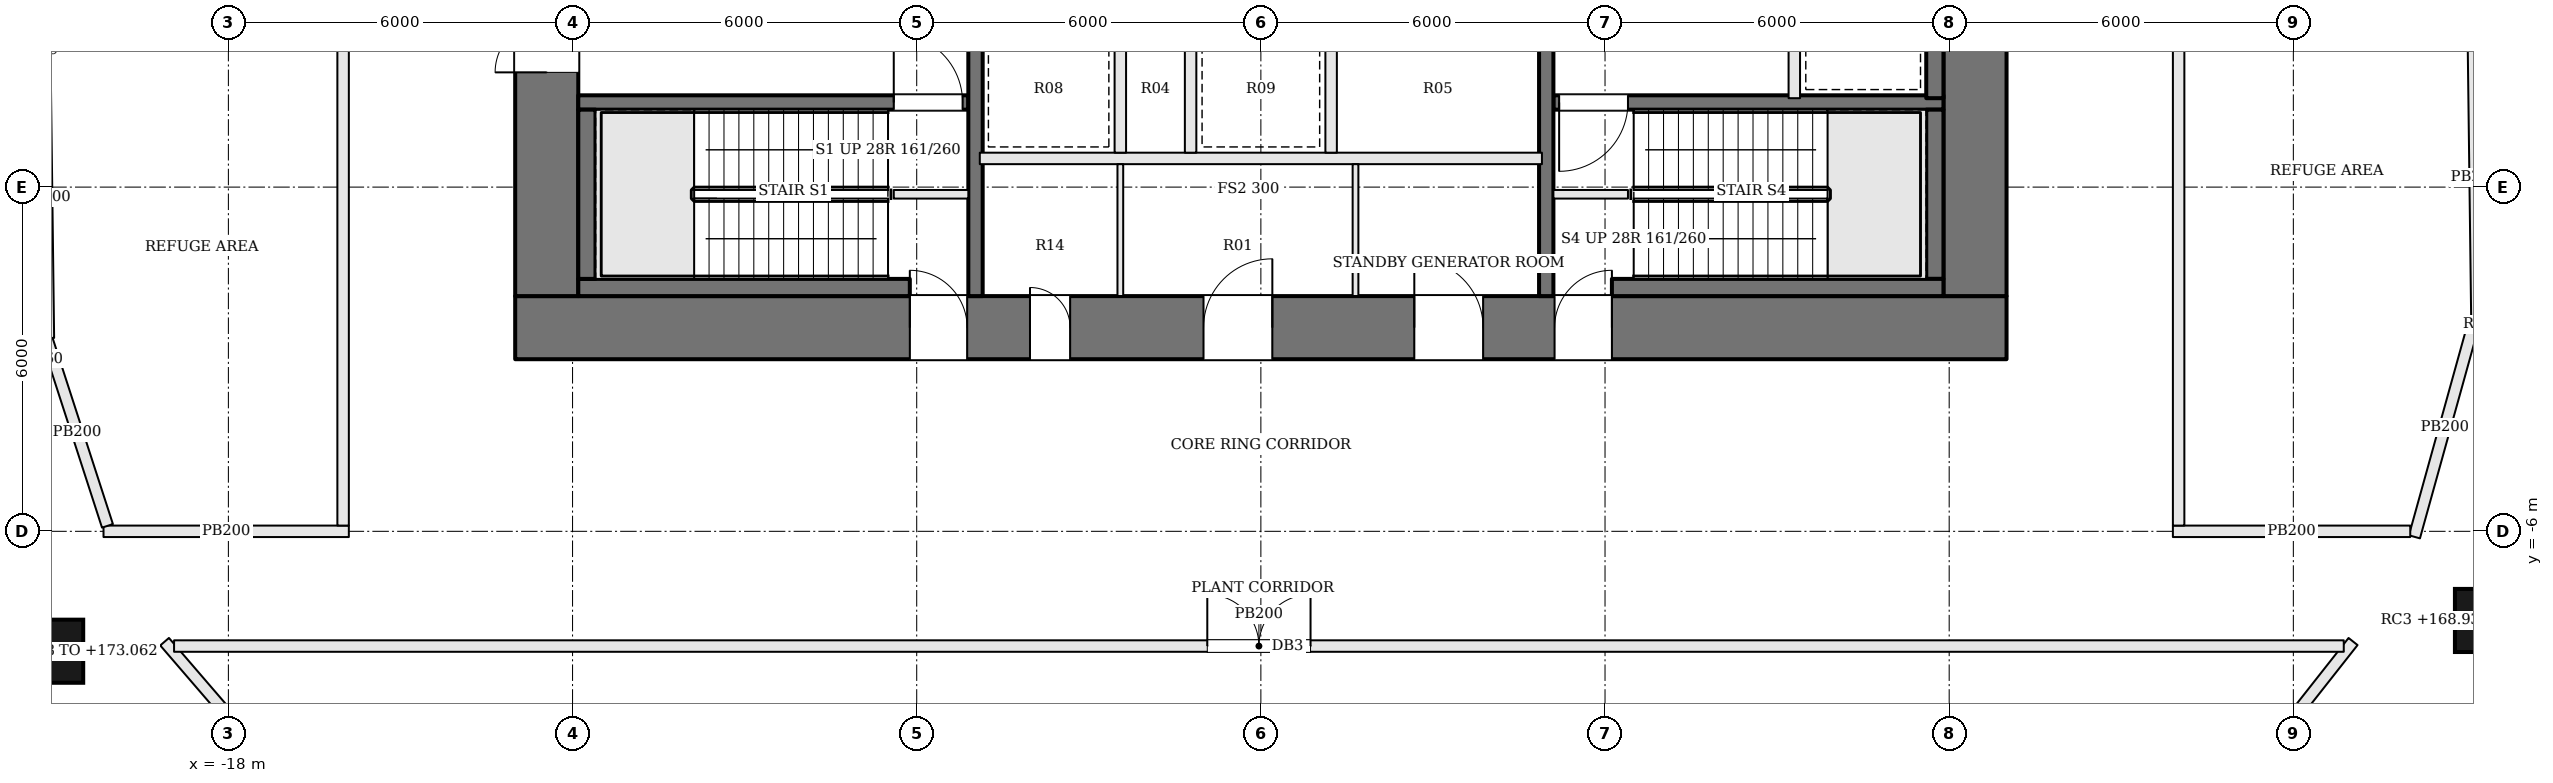
"""IFC4 building model, lengths in metres.
Left out: names, types, materials, properties, quantities, classifications, styles, units other than length and angle.
Written with IfcOpenShell. Run it as: python <this file> out.ifc"""

import sys

from ifc_helpers import new_model, si_unit, direction, frame, frame_2d, origin, origin_2d, place, context, subcontext, project, spatial, rectangle, extrude, element, fill, save


model = new_model("IFC4")
c1 = context("Model", 3, precision=1e-05, world=origin(), true_north=direction((0.0, 1.0)))
c2 = subcontext(c1, "Body", "Model", "MODEL_VIEW")
j1 = project(units=[si_unit("LENGTHUNIT", "METRE"), si_unit("PLANEANGLEUNIT", "RADIAN")], contexts=[c1])
p1 = place(None, origin())
s1 = spatial("IfcSite", under=j1, at=p1, CompositionType="ELEMENT")
p2 = place(p1, origin())
s2 = spatial("IfcBuilding", under=s1, at=p2, CompositionType="ELEMENT")
p3 = place(p2, frame((0.0, 0.0, 169.5)))
s3 = spatial("IfcBuildingStorey", under=s2, at=p3, CompositionType="ELEMENT", Elevation=169.5)
p4 = place(p3, frame((-13.0, -2.45, 0.0), z_axis=(0.0, 0.0, 1.0), x_axis=(1.0, 0.0, 0.0)))
e1 = element("IfcWall", 1, at=p4, inside=s3, PredefinedType="SHEAR", context=c2, shape_type="SweptSolid", body=[
    extrude(rectangle(XDim=26.0, YDim=1.1, at=frame_2d((13.0, 0.0))), origin(), (0.0, 0.0, 1.0), 4.5),
])
p5 = place(p4, frame((8.975, 0.0, 0.0)))
e2 = element("IfcOpeningElement", 2, at=p5, cuts=e1, PredefinedType="OPENING", context=c2, shape_type="SweptSolid", body=[
    extrude(rectangle(XDim=0.7, YDim=2.1, at=frame_2d((0.35, 1.05))), frame((0.0, 0.56, 0.0), z_axis=(0.0, -1.0, 0.0), x_axis=(1.0, 0.0, 0.0)), (0.0, 0.0, 1.0), 1.12),
])
p6 = place(p4, frame((12.0, 0.0, 0.0)))
e3 = element("IfcOpeningElement", 3, at=p6, cuts=e1, PredefinedType="OPENING", context=c2, shape_type="SweptSolid", body=[
    extrude(rectangle(XDim=1.2, YDim=2.1, at=frame_2d((0.6, 1.05))), frame((0.0, 0.56, 0.0), z_axis=(0.0, -1.0, 0.0), x_axis=(1.0, 0.0, 0.0)), (0.0, 0.0, 1.0), 1.12),
])
p7 = place(p4, frame((15.675, 0.0, 0.0)))
e4 = element("IfcOpeningElement", 4, at=p7, cuts=e1, PredefinedType="OPENING", context=c2, shape_type="SweptSolid", body=[
    extrude(rectangle(XDim=1.2, YDim=2.1, at=frame_2d((0.6, 1.05))), frame((0.0, 0.56, 0.0), z_axis=(0.0, -1.0, 0.0), x_axis=(1.0, 0.0, 0.0)), (0.0, 0.0, 1.0), 1.12),
])
p8 = place(p4, frame((6.88, 0.0, 0.0)))
e5 = element("IfcOpeningElement", 5, at=p8, cuts=e1, PredefinedType="OPENING", context=c2, shape_type="SweptSolid", body=[
    extrude(rectangle(XDim=1.0, YDim=2.1, at=frame_2d((0.5, 1.05))), frame((0.0, 0.56, 0.0), z_axis=(0.0, -1.0, 0.0), x_axis=(1.0, 0.0, 0.0)), (0.0, 0.0, 1.0), 1.12),
])
p9 = place(p4, frame((18.12, 0.0, 0.0)))
e6 = element("IfcOpeningElement", 6, at=p9, cuts=e1, PredefinedType="OPENING", context=c2, shape_type="SweptSolid", body=[
    extrude(rectangle(XDim=1.0, YDim=2.1, at=frame_2d((0.5, 1.05))), frame((0.0, 0.56, 0.0), z_axis=(0.0, -1.0, 0.0), x_axis=(1.0, 0.0, 0.0)), (0.0, 0.0, 1.0), 1.12),
])
p10 = place(p3, frame((12.45, -1.9, 0.0), z_axis=(0.0, 0.0, 1.0), x_axis=(0.0, 1.0, 0.0)))
e7 = element("IfcWall", 7, at=p10, inside=s3, PredefinedType="SHEAR", context=c2, shape_type="SweptSolid", body=[
    extrude(rectangle(XDim=12.8, YDim=1.1, at=frame_2d((6.4, 0.0))), origin(), (0.0, 0.0, 1.0), 4.5),
])
p11 = place(p10, frame((7.1, 0.0, 0.0)))
e8 = element("IfcOpeningElement", 8, at=p11, cuts=e7, PredefinedType="OPENING", context=c2, shape_type="SweptSolid", body=[
    extrude(rectangle(XDim=1.8, YDim=2.1, at=frame_2d((0.9, 1.05))), frame((0.0, 0.56, 0.0), z_axis=(0.0, -1.0, 0.0), x_axis=(1.0, 0.0, 0.0)), (0.0, 0.0, 1.0), 1.12),
])
p12 = place(p3, frame((-12.45, -1.9, 0.0), z_axis=(0.0, 0.0, 1.0), x_axis=(0.0, 1.0, 0.0)))
e9 = element("IfcWall", 9, at=p12, inside=s3, PredefinedType="SHEAR", context=c2, shape_type="SweptSolid", body=[
    extrude(rectangle(XDim=12.8, YDim=1.1, at=frame_2d((6.4, 0.0))), origin(), (0.0, 0.0, 1.0), 4.5),
])
p13 = place(p12, frame((3.9, 0.0, 0.0)))
e10 = element("IfcOpeningElement", 10, at=p13, cuts=e9, PredefinedType="OPENING", context=c2, shape_type="SweptSolid", body=[
    extrude(rectangle(XDim=1.8, YDim=2.1, at=frame_2d((0.9, 1.05))), frame((0.0, 0.56, 0.0), z_axis=(0.0, -1.0, 0.0), x_axis=(1.0, 0.0, 0.0)), (0.0, 0.0, 1.0), 1.12),
])
p14 = place(p3, frame((-21.081, -8.09, -0.562), z_axis=(-0.394911202238, -0.153105850406, 0.90587181263), x_axis=(0.361480683506, -0.932379598367, 0.0)))
e11 = element("IfcColumn", 11, at=p14, inside=s3, PredefinedType="COLUMN", context=c2, shape_type="SweptSolid", body=[
    extrude(rectangle(XDim=1.1, YDim=1.1, at=origin_2d()), origin(), (0.0, 0.0, 1.0), 4.552),
])
p15 = place(p3, frame((21.367, -7.554, -0.562), z_axis=(0.399191098606, -0.144034709541, 0.905483555478), x_axis=(0.339399243932, 0.940642415171, 0.0)))
e12 = element("IfcColumn", 12, at=p15, inside=s3, PredefinedType="COLUMN", context=c2, shape_type="SweptSolid", body=[
    extrude(rectangle(XDim=1.1, YDim=1.1, at=origin_2d()), origin(), (0.0, 0.0, 1.0), 4.554),
])
for number, where, z_axis, x_axis in (
    (13, (-6.4, -0.125, 0.0), (0.0, 0.0, 1.0), (1.0, 0.0, 0.0)),
    (14, (6.4, -0.125, 0.0), (0.0, 0.0, 1.0), (-1.0, 0.0, 0.0)),
):
    element("IfcWall", number, at=place(p3, frame(where, z_axis=z_axis, x_axis=x_axis)), inside=s3, PredefinedType="SOLIDWALL", context=c2, shape_type="SweptSolid", body=[
        extrude(rectangle(XDim=1.3, YDim=0.15, at=frame_2d((0.65, 0.0))), origin(), (0.0, 0.0, 1.0), 4.3),
    ])
p16 = place(p3, frame((-11.9, 1.475, 0.0), z_axis=(0.0, 0.0, 1.0), x_axis=(1.0, 0.0, 0.0)))
e15 = element("IfcWall", 15, at=p16, inside=s3, PredefinedType="SOLIDWALL", context=c2, shape_type="SweptSolid", body=[
    extrude(rectangle(XDim=6.8, YDim=0.25, at=frame_2d((3.4, 0.0))), origin(), (0.0, 0.0, 1.0), 4.3),
])
p17 = place(p16, frame((5.5, 0.0, 0.0)))
e16 = element("IfcOpeningElement", 16, at=p17, cuts=e15, PredefinedType="OPENING", context=c2, shape_type="SweptSolid", body=[
    extrude(rectangle(XDim=1.2, YDim=2.1, at=frame_2d((0.6, 1.05))), frame((0.0, 0.135, 0.0), z_axis=(0.0, -1.0, 0.0), x_axis=(1.0, 0.0, 0.0)), (0.0, 0.0, 1.0), 0.27),
])
p18 = place(p3, frame((11.9, 1.475, 0.0), z_axis=(0.0, 0.0, 1.0), x_axis=(-1.0, 0.0, 0.0)))
e17 = element("IfcWall", 17, at=p18, inside=s3, PredefinedType="SOLIDWALL", context=c2, shape_type="SweptSolid", body=[
    extrude(rectangle(XDim=6.8, YDim=0.25, at=frame_2d((3.4, 0.0))), origin(), (0.0, 0.0, 1.0), 4.3),
])
p19 = place(p18, frame((5.5, 0.0, 0.0)))
e18 = element("IfcOpeningElement", 18, at=p19, cuts=e17, PredefinedType="OPENING", context=c2, shape_type="SweptSolid", body=[
    extrude(rectangle(XDim=1.2, YDim=2.1, at=frame_2d((0.6, 1.05))), frame((0.0, 0.135, 0.0), z_axis=(0.0, -1.0, 0.0), x_axis=(1.0, 0.0, 0.0)), (0.0, 0.0, 1.0), 0.27),
])
p20 = place(p3, frame((9.3, 4.55, 0.0), z_axis=(0.0, 0.0, 1.0), x_axis=(0.0, -1.0, 0.0)))
e19 = element("IfcWall", 19, at=p20, inside=s3, PredefinedType="SOLIDWALL", context=c2, shape_type="SweptSolid", body=[
    extrude(rectangle(XDim=3.0, YDim=0.2, at=frame_2d((1.5, 0.0))), origin(), (0.0, 0.0, 1.0), 4.3),
])
p21 = place(p3, frame((-4.975, -1.9, 0.0), z_axis=(0.0, 0.0, 1.0), x_axis=(0.0, 1.0, 0.0)))
e20 = element("IfcWall", 20, at=p21, inside=s3, PredefinedType="SOLIDWALL", context=c2, shape_type="SweptSolid", body=[
    extrude(rectangle(XDim=12.8, YDim=0.25, at=frame_2d((6.4, 0.0))), origin(), (0.0, 0.0, 1.0), 4.3),
])
p22 = place(p21, frame((4.95, 0.0, 0.0)))
e21 = element("IfcOpeningElement", 21, at=p22, cuts=e20, PredefinedType="OPENING", context=c2, shape_type="SweptSolid", body=[
    extrude(rectangle(XDim=1.2, YDim=2.1, at=frame_2d((0.6, 1.05))), frame((0.0, 0.135, 0.0), z_axis=(0.0, -1.0, 0.0), x_axis=(1.0, 0.0, 0.0)), (0.0, 0.0, 1.0), 0.27),
])
p23 = place(p3, frame((4.975, 10.9, 0.0), z_axis=(0.0, 0.0, 1.0), x_axis=(0.0, -1.0, 0.0)))
e22 = element("IfcWall", 22, at=p23, inside=s3, PredefinedType="SOLIDWALL", context=c2, shape_type="SweptSolid", body=[
    extrude(rectangle(XDim=12.8, YDim=0.25, at=frame_2d((6.4, 0.0))), origin(), (0.0, 0.0, 1.0), 4.3),
])
p24 = place(p23, frame((4.95, 0.0, 0.0)))
e23 = element("IfcOpeningElement", 23, at=p24, cuts=e22, PredefinedType="OPENING", context=c2, shape_type="SweptSolid", body=[
    extrude(rectangle(XDim=1.2, YDim=2.1, at=frame_2d((0.6, 1.05))), frame((0.0, 0.135, 0.0), z_axis=(0.0, -1.0, 0.0), x_axis=(1.0, 0.0, 0.0)), (0.0, 0.0, 1.0), 0.27),
])
p25 = place(p3, frame((-11.9, -1.75, 0.0), z_axis=(0.0, 0.0, 1.0), x_axis=(1.0, 0.0, 0.0)))
e24 = element("IfcWall", 24, at=p25, inside=s3, PredefinedType="SOLIDWALL", context=c2, shape_type="SweptSolid", body=[
    extrude(rectangle(XDim=5.78, YDim=0.3, at=frame_2d((2.89, 0.0))), origin(), (0.0, 0.0, 1.0), 4.3),
])
p26 = place(p3, frame((-11.75, -1.6, 0.0), z_axis=(0.0, 0.0, 1.0), x_axis=(0.0, 1.0, 0.0)))
e25 = element("IfcWall", 25, at=p26, inside=s3, PredefinedType="SOLIDWALL", context=c2, shape_type="SweptSolid", body=[
    extrude(rectangle(XDim=2.95, YDim=0.3, at=frame_2d((1.475, 0.0))), origin(), (0.0, 0.0, 1.0), 4.3),
])
p27 = place(p3, frame((11.75, 4.55, 0.0), z_axis=(0.0, 0.0, 1.0), x_axis=(0.0, -1.0, 0.0)))
e26 = element("IfcWall", 26, at=p27, inside=s3, PredefinedType="SOLIDWALL", context=c2, shape_type="SweptSolid", body=[
    extrude(rectangle(XDim=3.0, YDim=0.3, at=frame_2d((1.5, 0.0))), origin(), (0.0, 0.0, 1.0), 4.3),
])
p28 = place(p3, frame((11.75, 1.35, 0.0), z_axis=(0.0, 0.0, 1.0), x_axis=(0.0, -1.0, 0.0)))
e27 = element("IfcWall", 27, at=p28, inside=s3, PredefinedType="SOLIDWALL", context=c2, shape_type="SweptSolid", body=[
    extrude(rectangle(XDim=2.95, YDim=0.3, at=frame_2d((1.475, 0.0))), origin(), (0.0, 0.0, 1.0), 4.3),
])
p29 = place(p3, frame((11.9, -1.75, 0.0), z_axis=(0.0, 0.0, 1.0), x_axis=(-1.0, 0.0, 0.0)))
e28 = element("IfcWall", 28, at=p29, inside=s3, PredefinedType="SOLIDWALL", context=c2, shape_type="SweptSolid", body=[
    extrude(rectangle(XDim=5.78, YDim=0.3, at=frame_2d((2.89, 0.0))), origin(), (0.0, 0.0, 1.0), 4.3),
])
p30 = place(p3, frame((-4.9, 0.5, 0.0), z_axis=(0.0, 0.0, 1.0), x_axis=(1.0, 0.0, 0.0)))
e29 = element("IfcWall", 29, at=p30, inside=s3, PredefinedType="SOLIDWALL", context=c2, shape_type="SweptSolid", body=[
    extrude(rectangle(XDim=9.8, YDim=0.2, at=frame_2d((4.9, 0.0))), origin(), (0.0, 0.0, 1.0), 4.3),
])
for number, where, z_axis, x_axis in (
    (30, (-2.45, 0.6, 0.0), (0.0, 0.0, 1.0), (0.0, 1.0, 0.0)),
    (31, (-1.225, 0.6, 0.0), (0.0, 0.0, 1.0), (0.0, 1.0, 0.0)),
    (32, (1.225, 0.6, 0.0), (0.0, 0.0, 1.0), (0.0, 1.0, 0.0)),
):
    element("IfcWall", number, at=place(p3, frame(where, z_axis=z_axis, x_axis=x_axis)), inside=s3, PredefinedType="SOLIDWALL", context=c2, shape_type="SweptSolid", body=[
        extrude(rectangle(XDim=2.2, YDim=0.2, at=frame_2d((1.1, 0.0))), origin(), (0.0, 0.0, 1.0), 4.3),
    ])
for number, where, z_axis, x_axis in (
    (33, (-2.45, -1.9, 0.0), (0.0, 0.0, 1.0), (0.0, 1.0, 0.0)),
    (34, (1.65, -1.9, 0.0), (0.0, 0.0, 1.0), (0.0, 1.0, 0.0)),
):
    element("IfcWall", number, at=place(p3, frame(where, z_axis=z_axis, x_axis=x_axis)), inside=s3, PredefinedType="PARTITIONING", context=c2, shape_type="SweptSolid", body=[
        extrude(rectangle(XDim=2.3, YDim=0.1, at=frame_2d((1.15, 0.0))), origin(), (0.0, 0.0, 1.0), 4.3),
    ])
p31 = place(p3, frame((19.041, -7.921, 0.0), z_axis=(0.0, 0.0, 1.0), x_axis=(-0.618817980567, -0.785534408493, 0.0)))
e35 = element("IfcWall", 35, at=p31, inside=s3, PredefinedType="PARTITIONING", context=c2, shape_type="SweptSolid", body=[
    extrude(rectangle(XDim=3.45, YDim=0.2, at=frame_2d((1.725, 0.0))), origin(), (0.0, 0.0, 1.0), 4.3),
])
p32 = place(p3, frame((-16.614, -10.824, 0.0), z_axis=(0.0, 0.0, 1.0), x_axis=(-0.652659458067, 0.757651391998, 0.0)))
e36 = element("IfcWall", 36, at=p32, inside=s3, PredefinedType="PARTITIONING", context=c2, shape_type="SweptSolid", body=[
    extrude(rectangle(XDim=3.827, YDim=0.2, at=frame_2d((1.914, 0.0))), origin(), (0.0, 0.0, 1.0), 4.3),
])
p33 = place(p3, frame((-18.947, -8.0, 0.0), z_axis=(0.0, 0.0, 1.0), x_axis=(1.0, 0.0, 0.0)))
e37 = element("IfcWall", 37, at=p33, inside=s3, PredefinedType="PARTITIONING", context=c2, shape_type="SweptSolid", body=[
    extrude(rectangle(XDim=37.826, YDim=0.2, at=frame_2d((18.913, 0.0))), origin(), (0.0, 0.0, 1.0), 4.3),
])
p34 = place(p33, frame((18.013, 0.0, 0.0)))
e38 = element("IfcOpeningElement", 38, at=p34, cuts=e37, PredefinedType="OPENING", context=c2, shape_type="SweptSolid", body=[
    extrude(rectangle(XDim=1.8, YDim=2.1, at=frame_2d((0.9, 1.05))), frame((0.0, 0.11, 0.0), z_axis=(0.0, -1.0, 0.0), x_axis=(1.0, 0.0, 0.0)), (0.0, 0.0, 1.0), 0.22),
])
p35 = place(p3, frame((-15.9, -6.0, 0.0), z_axis=(0.0, 0.0, 1.0), x_axis=(-1.0, 0.0, 0.0)))
e39 = element("IfcWall", 39, at=p35, inside=s3, PredefinedType="PARTITIONING", context=c2, shape_type="SweptSolid", body=[
    extrude(rectangle(XDim=4.277, YDim=0.2, at=frame_2d((2.139, 0.0))), origin(), (0.0, 0.0, 1.0), 4.3),
])
p36 = place(p3, frame((-20.108, -5.905, 0.0), z_axis=(0.0, 0.0, 1.0), x_axis=(-0.308376170844, 0.951264493848, 0.0)))
e40 = element("IfcWall", 40, at=p36, inside=s3, PredefinedType="PARTITIONING", context=c2, shape_type="SweptSolid", body=[
    extrude(rectangle(XDim=3.438, YDim=0.2, at=frame_2d((1.719, 0.0))), origin(), (0.0, 0.0, 1.0), 4.3),
])
p37 = place(p3, frame((-21.138, -2.63, 0.0), z_axis=(0.0, 0.0, 1.0), x_axis=(-0.012626385888, 0.999920284012, 0.0)))
e41 = element("IfcWall", 41, at=p37, inside=s3, PredefinedType="PARTITIONING", context=c2, shape_type="SweptSolid", body=[
    extrude(rectangle(XDim=4.911, YDim=0.2, at=frame_2d((2.456, 0.0))), origin(), (0.0, 0.0, 1.0), 4.3),
])
p38 = place(p3, frame((-21.172, 2.277, 0.0), z_axis=(0.0, 0.0, 1.0), x_axis=(0.267756413289, 0.963486638798, 0.0)))
e42 = element("IfcWall", 42, at=p38, inside=s3, PredefinedType="PARTITIONING", context=c2, shape_type="SweptSolid", body=[
    extrude(rectangle(XDim=4.811, YDim=0.2, at=frame_2d((2.405, 0.0))), origin(), (0.0, 0.0, 1.0), 4.3),
])
p39 = place(p3, frame((-16.0, 11.053, 0.0), z_axis=(0.0, 0.0, 1.0), x_axis=(0.0, -1.0, 0.0)))
e43 = element("IfcWall", 43, at=p39, inside=s3, PredefinedType="PARTITIONING", context=c2, shape_type="SweptSolid", body=[
    extrude(rectangle(XDim=16.953, YDim=0.2, at=frame_2d((8.477, 0.0))), origin(), (0.0, 0.0, 1.0), 4.3),
])
p40 = place(p39, frame((6.077, 0.0, 0.0)))
e44 = element("IfcOpeningElement", 44, at=p40, cuts=e43, PredefinedType="OPENING", context=c2, shape_type="SweptSolid", body=[
    extrude(rectangle(XDim=1.8, YDim=2.1, at=frame_2d((0.9, 1.05))), frame((0.0, 0.11, 0.0), z_axis=(0.0, -1.0, 0.0), x_axis=(1.0, 0.0, 0.0)), (0.0, 0.0, 1.0), 0.22),
])
p41 = place(p3, frame((21.138, 2.63, 0.0), z_axis=(0.0, 0.0, 1.0), x_axis=(0.012626385888, -0.999920284012, 0.0)))
e45 = element("IfcWall", 45, at=p41, inside=s3, PredefinedType="PARTITIONING", context=c2, shape_type="SweptSolid", body=[
    extrude(rectangle(XDim=4.911, YDim=0.2, at=frame_2d((2.456, 0.0))), origin(), (0.0, 0.0, 1.0), 4.3),
])
p42 = place(p3, frame((21.172, -2.277, 0.0), z_axis=(0.0, 0.0, 1.0), x_axis=(-0.267701048026, -0.963502023291, 0.0)))
e46 = element("IfcWall", 46, at=p42, inside=s3, PredefinedType="PARTITIONING", context=c2, shape_type="SweptSolid", body=[
    extrude(rectangle(XDim=3.964, YDim=0.2, at=frame_2d((1.982, 0.0))), origin(), (0.0, 0.0, 1.0), 4.3),
])
p43 = place(p3, frame((20.038, -6.0, 0.0), z_axis=(0.0, 0.0, 1.0), x_axis=(-1.0, 0.0, 0.0)))
e47 = element("IfcWall", 47, at=p43, inside=s3, PredefinedType="PARTITIONING", context=c2, shape_type="SweptSolid", body=[
    extrude(rectangle(XDim=4.138, YDim=0.2, at=frame_2d((2.069, 0.0))), origin(), (0.0, 0.0, 1.0), 4.3),
])
p44 = place(p3, frame((16.0, -5.9, 0.0), z_axis=(0.0, 0.0, 1.0), x_axis=(0.0, 1.0, 0.0)))
e48 = element("IfcWall", 48, at=p44, inside=s3, PredefinedType="PARTITIONING", context=c2, shape_type="SweptSolid", body=[
    extrude(rectangle(XDim=17.017, YDim=0.2, at=frame_2d((8.508, 0.0))), origin(), (0.0, 0.0, 1.0), 4.3),
])
p45 = place(p44, frame((9.108, 0.0, 0.0)))
e49 = element("IfcOpeningElement", 49, at=p45, cuts=e48, PredefinedType="OPENING", context=c2, shape_type="SweptSolid", body=[
    extrude(rectangle(XDim=1.8, YDim=2.1, at=frame_2d((0.9, 1.05))), frame((0.0, 0.11, 0.0), z_axis=(0.0, -1.0, 0.0), x_axis=(1.0, 0.0, 0.0)), (0.0, 0.0, 1.0), 0.22),
])
p46 = place(p13, origin())
e50 = element("IfcDoor", 50, at=p46, inside=s3, OperationType="DOUBLE_DOOR_SINGLE_SWING", PredefinedType="DOOR", context=c2, shape_type="SweptSolid", body=[
    extrude(rectangle(XDim=1.8, YDim=2.1, at=frame_2d((0.9, 1.05))), frame((0.0, 0.025, 0.0), z_axis=(0.0, -1.0, 0.0), x_axis=(1.0, 0.0, 0.0)), (0.0, 0.0, 1.0), 0.05),
])
fill(e10, e50)
p47 = place(p17, origin())
e51 = element("IfcDoor", 51, at=p47, inside=s3, OperationType="SINGLE_SWING_LEFT", PredefinedType="DOOR", context=c2, shape_type="SweptSolid", body=[
    extrude(rectangle(XDim=1.2, YDim=2.1, at=frame_2d((0.6, 1.05))), frame((0.0, 0.025, 0.0), z_axis=(0.0, -1.0, 0.0), x_axis=(1.0, 0.0, 0.0)), (0.0, 0.0, 1.0), 0.05),
])
fill(e16, e51)
p48 = place(p19, origin())
e52 = element("IfcDoor", 52, at=p48, inside=s3, OperationType="SINGLE_SWING_RIGHT", PredefinedType="DOOR", context=c2, shape_type="SweptSolid", body=[
    extrude(rectangle(XDim=1.2, YDim=2.1, at=frame_2d((0.6, 1.05))), frame((0.0, 0.025, 0.0), z_axis=(0.0, -1.0, 0.0), x_axis=(1.0, 0.0, 0.0)), (0.0, 0.0, 1.0), 0.05),
])
fill(e18, e52)
p49 = place(p5, origin())
e53 = element("IfcDoor", 53, at=p49, inside=s3, OperationType="SINGLE_SWING_LEFT", PredefinedType="DOOR", context=c2, shape_type="SweptSolid", body=[
    extrude(rectangle(XDim=0.7, YDim=2.1, at=frame_2d((0.35, 1.05))), frame((0.0, 0.025, 0.0), z_axis=(0.0, -1.0, 0.0), x_axis=(1.0, 0.0, 0.0)), (0.0, 0.0, 1.0), 0.05),
])
fill(e2, e53)
p50 = place(p6, origin())
e54 = element("IfcDoor", 54, at=p50, inside=s3, OperationType="SINGLE_SWING_RIGHT", PredefinedType="DOOR", context=c2, shape_type="SweptSolid", body=[
    extrude(rectangle(XDim=1.2, YDim=2.1, at=frame_2d((0.6, 1.05))), frame((0.0, 0.025, 0.0), z_axis=(0.0, -1.0, 0.0), x_axis=(1.0, 0.0, 0.0)), (0.0, 0.0, 1.0), 0.05),
])
fill(e3, e54)
p51 = place(p7, origin())
e55 = element("IfcDoor", 55, at=p51, inside=s3, OperationType="SINGLE_SWING_LEFT", PredefinedType="DOOR", context=c2, shape_type="SweptSolid", body=[
    extrude(rectangle(XDim=1.2, YDim=2.1, at=frame_2d((0.6, 1.05))), frame((0.0, 0.025, 0.0), z_axis=(0.0, -1.0, 0.0), x_axis=(1.0, 0.0, 0.0)), (0.0, 0.0, 1.0), 0.05),
])
fill(e4, e55)
p52 = place(p8, origin())
e56 = element("IfcDoor", 56, at=p52, inside=s3, OperationType="SINGLE_SWING_LEFT", PredefinedType="DOOR", context=c2, shape_type="SweptSolid", body=[
    extrude(rectangle(XDim=1.0, YDim=2.1, at=frame_2d((0.5, 1.05))), frame((0.0, 0.025, 0.0), z_axis=(0.0, -1.0, 0.0), x_axis=(1.0, 0.0, 0.0)), (0.0, 0.0, 1.0), 0.05),
])
fill(e5, e56)
p53 = place(p9, origin())
e57 = element("IfcDoor", 57, at=p53, inside=s3, OperationType="SINGLE_SWING_RIGHT", PredefinedType="DOOR", context=c2, shape_type="SweptSolid", body=[
    extrude(rectangle(XDim=1.0, YDim=2.1, at=frame_2d((0.5, 1.05))), frame((0.0, 0.025, 0.0), z_axis=(0.0, -1.0, 0.0), x_axis=(1.0, 0.0, 0.0)), (0.0, 0.0, 1.0), 0.05),
])
fill(e6, e57)
p54 = place(p34, origin())
e58 = element("IfcDoor", 58, at=p54, inside=s3, OperationType="DOUBLE_DOOR_SINGLE_SWING", PredefinedType="DOOR", context=c2, shape_type="SweptSolid", body=[
    extrude(rectangle(XDim=1.8, YDim=2.1, at=frame_2d((0.9, 1.05))), frame((0.0, 0.025, 0.0), z_axis=(0.0, -1.0, 0.0), x_axis=(1.0, 0.0, 0.0)), (0.0, 0.0, 1.0), 0.05),
])
fill(e38, e58)
save(model, sys.argv[1])
